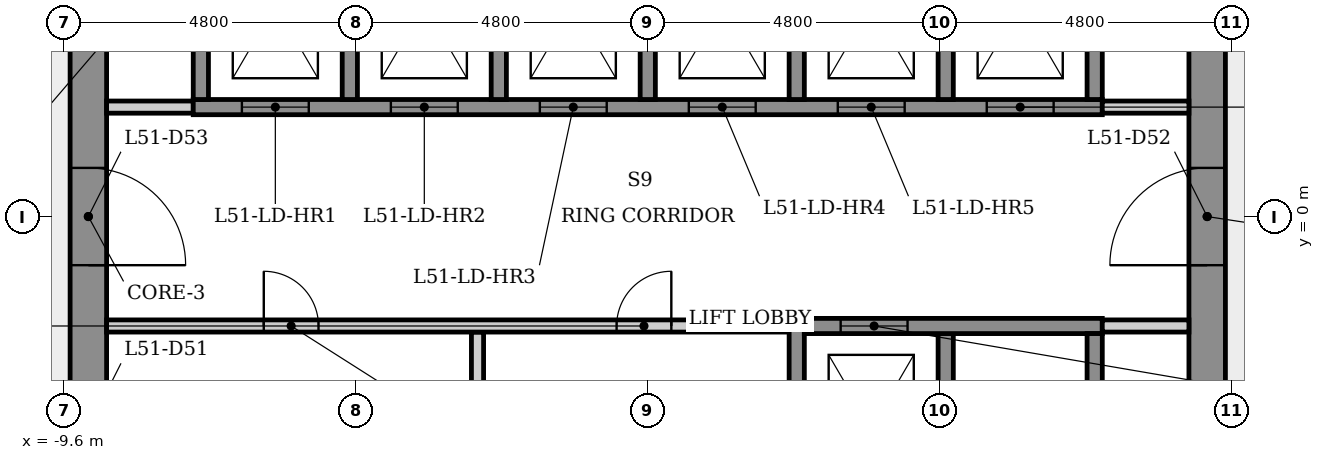
"""IFC4 building model, lengths in metres.
Left out: names, types, materials, properties, quantities, classifications, styles, units other than length and angle.
Written with IfcOpenShell. Run it as: python <this file> out.ifc"""

import sys

from ifc_helpers import new_model, si_unit, direction, frame, frame_2d, origin, place, context, subcontext, project, spatial, rectangle, extrude, element, fill, save


model = new_model("IFC4")
c1 = context("Model", 3, precision=1e-05, world=origin(), true_north=direction((0.0, 1.0)))
c2 = subcontext(c1, "Body", "Model", "MODEL_VIEW")
j1 = project(units=[si_unit("LENGTHUNIT", "METRE"), si_unit("PLANEANGLEUNIT", "RADIAN")], contexts=[c1])
p1 = place(None, origin())
s1 = spatial("IfcSite", under=j1, at=p1, CompositionType="ELEMENT")
p2 = place(p1, origin())
s2 = spatial("IfcBuilding", under=s1, at=p2, CompositionType="ELEMENT")
p3 = place(p2, frame((0.0, 0.0, 190.7)))
s3 = spatial("IfcBuildingStorey", under=s2, at=p3, CompositionType="ELEMENT", Elevation=190.7)
p4 = place(p3, frame((9.2, -5.485, 0.0), z_axis=(0.0, 0.0, 1.0), x_axis=(0.0, 1.0, 0.0)))
e1 = element("IfcWall", 1, at=p4, inside=s3, PredefinedType="SHEAR", context=c2, shape_type="SweptSolid", body=[
    extrude(rectangle(XDim=10.97, YDim=0.6, at=frame_2d((5.485, 0.0))), origin(), (0.0, 0.0, 1.0), 4.0),
])
p5 = place(p4, frame((4.685, 0.0, 0.0)))
e2 = element("IfcOpeningElement", 2, at=p5, cuts=e1, PredefinedType="OPENING", context=c2, shape_type="SweptSolid", body=[
    extrude(rectangle(XDim=1.6, YDim=2.1, at=frame_2d((0.8, 1.05))), frame((0.0, 0.31, 0.0), z_axis=(0.0, -1.0, 0.0), x_axis=(1.0, 0.0, 0.0)), (0.0, 0.0, 1.0), 0.62),
])
p6 = place(p3, frame((-9.2, 5.485, 0.0), z_axis=(0.0, 0.0, 1.0), x_axis=(0.0, -1.0, 0.0)))
e3 = element("IfcWall", 3, at=p6, inside=s3, PredefinedType="SHEAR", context=c2, shape_type="SweptSolid", body=[
    extrude(rectangle(XDim=10.97, YDim=0.6, at=frame_2d((5.485, 0.0))), origin(), (0.0, 0.0, 1.0), 4.0),
])
p7 = place(p6, frame((8.516, 0.0, 0.0)))
e4 = element("IfcOpeningElement", 4, at=p7, cuts=e3, PredefinedType="OPENING", context=c2, shape_type="SweptSolid", body=[
    extrude(rectangle(XDim=0.9, YDim=2.1, at=frame_2d((0.45, 1.05))), frame((0.0, 0.31, 0.0), z_axis=(0.0, -1.0, 0.0), x_axis=(1.0, 0.0, 0.0)), (0.0, 0.0, 1.0), 0.62),
])
p8 = place(p6, frame((4.685, 0.0, 0.0)))
e5 = element("IfcOpeningElement", 5, at=p8, cuts=e3, PredefinedType="OPENING", context=c2, shape_type="SweptSolid", body=[
    extrude(rectangle(XDim=1.6, YDim=2.1, at=frame_2d((0.8, 1.05))), frame((0.0, 0.31, 0.0), z_axis=(0.0, -1.0, 0.0), x_axis=(1.0, 0.0, 0.0)), (0.0, 0.0, 1.0), 0.62),
])
p9 = place(p3, frame((-8.9, 1.8, 0.0), z_axis=(0.0, 0.0, 1.0), x_axis=(1.0, 0.0, 0.0)))
e6 = element("IfcWall", 6, at=p9, inside=s3, PredefinedType="PARTITIONING", context=c2, shape_type="SweptSolid", body=[
    extrude(rectangle(XDim=1.425, YDim=0.2, at=frame_2d((0.712, 0.0))), origin(), (0.0, 0.0, 1.0), 3.6),
])
p10 = place(p3, frame((-7.475, 1.8, 0.0), z_axis=(0.0, 0.0, 1.0), x_axis=(1.0, 0.0, 0.0)))
e7 = element("IfcWall", 7, at=p10, inside=s3, PredefinedType="SHEAR", context=c2, shape_type="SweptSolid", body=[
    extrude(rectangle(XDim=14.95, YDim=0.25, at=frame_2d((7.475, 0.0))), origin(), (0.0, 0.0, 1.0), 3.6),
])
p11 = place(p10, frame((0.8, 0.0, 0.0)))
e8 = element("IfcOpeningElement", 8, at=p11, cuts=e7, PredefinedType="OPENING", context=c2, shape_type="SweptSolid", body=[
    extrude(rectangle(XDim=1.1, YDim=2.1, at=frame_2d((0.55, 1.05))), frame((0.0, 0.135, 0.0), z_axis=(0.0, -1.0, 0.0), x_axis=(1.0, 0.0, 0.0)), (0.0, 0.0, 1.0), 0.27),
])
p12 = place(p10, frame((3.25, 0.0, 0.0)))
e9 = element("IfcOpeningElement", 9, at=p12, cuts=e7, PredefinedType="OPENING", context=c2, shape_type="SweptSolid", body=[
    extrude(rectangle(XDim=1.1, YDim=2.1, at=frame_2d((0.55, 1.05))), frame((0.0, 0.135, 0.0), z_axis=(0.0, -1.0, 0.0), x_axis=(1.0, 0.0, 0.0)), (0.0, 0.0, 1.0), 0.27),
])
p13 = place(p10, frame((5.7, 0.0, 0.0)))
e10 = element("IfcOpeningElement", 10, at=p13, cuts=e7, PredefinedType="OPENING", context=c2, shape_type="SweptSolid", body=[
    extrude(rectangle(XDim=1.1, YDim=2.1, at=frame_2d((0.55, 1.05))), frame((0.0, 0.135, 0.0), z_axis=(0.0, -1.0, 0.0), x_axis=(1.0, 0.0, 0.0)), (0.0, 0.0, 1.0), 0.27),
])
p14 = place(p10, frame((8.15, 0.0, 0.0)))
e11 = element("IfcOpeningElement", 11, at=p14, cuts=e7, PredefinedType="OPENING", context=c2, shape_type="SweptSolid", body=[
    extrude(rectangle(XDim=1.1, YDim=2.1, at=frame_2d((0.55, 1.05))), frame((0.0, 0.135, 0.0), z_axis=(0.0, -1.0, 0.0), x_axis=(1.0, 0.0, 0.0)), (0.0, 0.0, 1.0), 0.27),
])
p15 = place(p10, frame((10.6, 0.0, 0.0)))
e12 = element("IfcOpeningElement", 12, at=p15, cuts=e7, PredefinedType="OPENING", context=c2, shape_type="SweptSolid", body=[
    extrude(rectangle(XDim=1.1, YDim=2.1, at=frame_2d((0.55, 1.05))), frame((0.0, 0.135, 0.0), z_axis=(0.0, -1.0, 0.0), x_axis=(1.0, 0.0, 0.0)), (0.0, 0.0, 1.0), 0.27),
])
p16 = place(p10, frame((13.05, 0.0, 0.0)))
e13 = element("IfcOpeningElement", 13, at=p16, cuts=e7, PredefinedType="OPENING", context=c2, shape_type="SweptSolid", body=[
    extrude(rectangle(XDim=1.1, YDim=2.1, at=frame_2d((0.55, 1.05))), frame((0.0, 0.135, 0.0), z_axis=(0.0, -1.0, 0.0), x_axis=(1.0, 0.0, 0.0)), (0.0, 0.0, 1.0), 0.27),
])
p17 = place(p3, frame((-7.35, 1.925, 0.0), z_axis=(0.0, 0.0, 1.0), x_axis=(0.0, 1.0, 0.0)))
e14 = element("IfcWall", 14, at=p17, inside=s3, PredefinedType="SHEAR", context=c2, shape_type="SweptSolid", body=[
    extrude(rectangle(XDim=4.036, YDim=0.25, at=frame_2d((2.018, 0.0))), origin(), (0.0, 0.0, 1.0), 3.6),
])
p18 = place(p3, frame((-4.9, 5.025, 0.0), z_axis=(0.0, 0.0, 1.0), x_axis=(0.0, -1.0, 0.0)))
e15 = element("IfcWall", 15, at=p18, inside=s3, PredefinedType="SHEAR", context=c2, shape_type="SweptSolid", body=[
    extrude(rectangle(XDim=3.1, YDim=0.25, at=frame_2d((1.55, 0.0))), origin(), (0.0, 0.0, 1.0), 4.0),
])
p19 = place(p3, frame((-2.8, -1.9, 0.0), z_axis=(0.0, 0.0, 1.0), x_axis=(0.0, -1.0, 0.0)))
e16 = element("IfcWall", 16, at=p19, inside=s3, PredefinedType="PARTITIONING", context=c2, shape_type="SweptSolid", body=[
    extrude(rectangle(XDim=3.15, YDim=0.2, at=frame_2d((1.575, 0.0))), origin(), (0.0, 0.0, 1.0), 3.6),
])
p20 = place(p3, frame((-8.9, -1.8, 0.0), z_axis=(0.0, 0.0, 1.0), x_axis=(1.0, 0.0, 0.0)))
e17 = element("IfcWall", 17, at=p20, inside=s3, PredefinedType="PARTITIONING", context=c2, shape_type="SweptSolid", body=[
    extrude(rectangle(XDim=11.225, YDim=0.2, at=frame_2d((5.613, 0.0))), origin(), (0.0, 0.0, 1.0), 3.6),
])
p21 = place(p20, frame((2.585, 0.0, 0.0)))
e18 = element("IfcOpeningElement", 18, at=p21, cuts=e17, PredefinedType="OPENING", context=c2, shape_type="SweptSolid", body=[
    extrude(rectangle(XDim=0.9, YDim=2.1, at=frame_2d((0.45, 1.05))), frame((0.0, 0.11, 0.0), z_axis=(0.0, -1.0, 0.0), x_axis=(1.0, 0.0, 0.0)), (0.0, 0.0, 1.0), 0.22),
])
p22 = place(p20, frame((8.387, 0.0, 0.0)))
e19 = element("IfcOpeningElement", 19, at=p22, cuts=e17, PredefinedType="OPENING", context=c2, shape_type="SweptSolid", body=[
    extrude(rectangle(XDim=0.9, YDim=2.1, at=frame_2d((0.45, 1.05))), frame((0.0, 0.11, 0.0), z_axis=(0.0, -1.0, 0.0), x_axis=(1.0, 0.0, 0.0)), (0.0, 0.0, 1.0), 0.22),
])
for number, where, z_axis, x_axis in (
    (20, (-2.45, 5.025, 0.0), (0.0, 0.0, 1.0), (0.0, -1.0, 0.0)),
    (21, (0.0, 5.025, 0.0), (0.0, 0.0, 1.0), (0.0, -1.0, 0.0)),
):
    element("IfcWall", number, at=place(p3, frame(where, z_axis=z_axis, x_axis=x_axis)), inside=s3, PredefinedType="SHEAR", context=c2, shape_type="SweptSolid", body=[
        extrude(rectangle(XDim=3.1, YDim=0.25, at=frame_2d((1.55, 0.0))), origin(), (0.0, 0.0, 1.0), 4.0),
    ])
p23 = place(p3, frame((2.45, -5.275, 0.0), z_axis=(0.0, 0.0, 1.0), x_axis=(0.0, 1.0, 0.0)))
e22 = element("IfcWall", 22, at=p23, inside=s3, PredefinedType="SHEAR", context=c2, shape_type="SweptSolid", body=[
    extrude(rectangle(XDim=3.6, YDim=0.25, at=frame_2d((1.8, 0.0))), origin(), (0.0, 0.0, 1.0), 3.6),
])
for number, where, z_axis, x_axis in (
    (23, (2.45, 5.025, 0.0), (0.0, 0.0, 1.0), (0.0, -1.0, 0.0)),
    (24, (4.9, -1.925, 0.0), (0.0, 0.0, 1.0), (0.0, -1.0, 0.0)),
    (25, (4.9, 5.025, 0.0), (0.0, 0.0, 1.0), (0.0, -1.0, 0.0)),
):
    element("IfcWall", number, at=place(p3, frame(where, z_axis=z_axis, x_axis=x_axis)), inside=s3, PredefinedType="SHEAR", context=c2, shape_type="SweptSolid", body=[
        extrude(rectangle(XDim=3.1, YDim=0.25, at=frame_2d((1.55, 0.0))), origin(), (0.0, 0.0, 1.0), 4.0),
    ])
p24 = place(p3, frame((2.575, -1.8, 0.0), z_axis=(0.0, 0.0, 1.0), x_axis=(1.0, 0.0, 0.0)))
e26 = element("IfcWall", 26, at=p24, inside=s3, PredefinedType="SHEAR", context=c2, shape_type="SweptSolid", body=[
    extrude(rectangle(XDim=4.9, YDim=0.25, at=frame_2d((2.45, 0.0))), origin(), (0.0, 0.0, 1.0), 3.6),
])
p25 = place(p24, frame((0.597, 0.0, 0.0)))
e27 = element("IfcOpeningElement", 27, at=p25, cuts=e26, PredefinedType="OPENING", context=c2, shape_type="SweptSolid", body=[
    extrude(rectangle(XDim=1.1, YDim=2.1, at=frame_2d((0.55, 1.05))), frame((0.0, 0.135, 0.0), z_axis=(0.0, -1.0, 0.0), x_axis=(1.0, 0.0, 0.0)), (0.0, 0.0, 1.0), 0.27),
])
p26 = place(p3, frame((7.475, 1.8, 0.0), z_axis=(0.0, 0.0, 1.0), x_axis=(1.0, 0.0, 0.0)))
e28 = element("IfcWall", 28, at=p26, inside=s3, PredefinedType="PARTITIONING", context=c2, shape_type="SweptSolid", body=[
    extrude(rectangle(XDim=1.425, YDim=0.2, at=frame_2d((0.712, 0.0))), origin(), (0.0, 0.0, 1.0), 3.6),
])
for number, where, z_axis, x_axis in (
    (29, (7.35, -1.925, 0.0), (0.0, 0.0, 1.0), (0.0, -1.0, 0.0)),
    (30, (7.35, 5.025, 0.0), (0.0, 0.0, 1.0), (0.0, -1.0, 0.0)),
):
    element("IfcWall", number, at=place(p3, frame(where, z_axis=z_axis, x_axis=x_axis)), inside=s3, PredefinedType="SHEAR", context=c2, shape_type="SweptSolid", body=[
        extrude(rectangle(XDim=3.1, YDim=0.25, at=frame_2d((1.55, 0.0))), origin(), (0.0, 0.0, 1.0), 4.0),
    ])
p27 = place(p3, frame((8.9, -1.8, 0.0), z_axis=(0.0, 0.0, 1.0), x_axis=(-1.0, 0.0, 0.0)))
e31 = element("IfcWall", 31, at=p27, inside=s3, PredefinedType="PARTITIONING", context=c2, shape_type="SweptSolid", body=[
    extrude(rectangle(XDim=1.425, YDim=0.2, at=frame_2d((0.712, 0.0))), origin(), (0.0, 0.0, 1.0), 3.6),
])
p28 = place(p11, origin())
e32 = element("IfcDoor", 32, at=p28, inside=s3, OperationType="SLIDING_TO_LEFT", PredefinedType="DOOR", context=c2, shape_type="SweptSolid", body=[
    extrude(rectangle(XDim=1.1, YDim=2.1, at=frame_2d((0.55, 1.05))), frame((0.0, 0.025, 0.0), z_axis=(0.0, -1.0, 0.0), x_axis=(1.0, 0.0, 0.0)), (0.0, 0.0, 1.0), 0.05),
])
fill(e8, e32)
p29 = place(p12, origin())
e33 = element("IfcDoor", 33, at=p29, inside=s3, OperationType="SLIDING_TO_LEFT", PredefinedType="DOOR", context=c2, shape_type="SweptSolid", body=[
    extrude(rectangle(XDim=1.1, YDim=2.1, at=frame_2d((0.55, 1.05))), frame((0.0, 0.025, 0.0), z_axis=(0.0, -1.0, 0.0), x_axis=(1.0, 0.0, 0.0)), (0.0, 0.0, 1.0), 0.05),
])
fill(e9, e33)
p30 = place(p13, origin())
e34 = element("IfcDoor", 34, at=p30, inside=s3, OperationType="SLIDING_TO_LEFT", PredefinedType="DOOR", context=c2, shape_type="SweptSolid", body=[
    extrude(rectangle(XDim=1.1, YDim=2.1, at=frame_2d((0.55, 1.05))), frame((0.0, 0.025, 0.0), z_axis=(0.0, -1.0, 0.0), x_axis=(1.0, 0.0, 0.0)), (0.0, 0.0, 1.0), 0.05),
])
fill(e10, e34)
p31 = place(p14, origin())
e35 = element("IfcDoor", 35, at=p31, inside=s3, OperationType="SLIDING_TO_LEFT", PredefinedType="DOOR", context=c2, shape_type="SweptSolid", body=[
    extrude(rectangle(XDim=1.1, YDim=2.1, at=frame_2d((0.55, 1.05))), frame((0.0, 0.025, 0.0), z_axis=(0.0, -1.0, 0.0), x_axis=(1.0, 0.0, 0.0)), (0.0, 0.0, 1.0), 0.05),
])
fill(e11, e35)
p32 = place(p15, origin())
e36 = element("IfcDoor", 36, at=p32, inside=s3, OperationType="SLIDING_TO_LEFT", PredefinedType="DOOR", context=c2, shape_type="SweptSolid", body=[
    extrude(rectangle(XDim=1.1, YDim=2.1, at=frame_2d((0.55, 1.05))), frame((0.0, 0.025, 0.0), z_axis=(0.0, -1.0, 0.0), x_axis=(1.0, 0.0, 0.0)), (0.0, 0.0, 1.0), 0.05),
])
fill(e12, e36)
p33 = place(p16, origin())
e37 = element("IfcDoor", 37, at=p33, inside=s3, OperationType="SLIDING_TO_LEFT", PredefinedType="DOOR", context=c2, shape_type="SweptSolid", body=[
    extrude(rectangle(XDim=1.1, YDim=2.1, at=frame_2d((0.55, 1.05))), frame((0.0, 0.025, 0.0), z_axis=(0.0, -1.0, 0.0), x_axis=(1.0, 0.0, 0.0)), (0.0, 0.0, 1.0), 0.05),
])
fill(e13, e37)
p34 = place(p25, origin())
e38 = element("IfcDoor", 38, at=p34, inside=s3, OperationType="SLIDING_TO_LEFT", PredefinedType="DOOR", context=c2, shape_type="SweptSolid", body=[
    extrude(rectangle(XDim=1.1, YDim=2.1, at=frame_2d((0.55, 1.05))), frame((0.0, 0.025, 0.0), z_axis=(0.0, -1.0, 0.0), x_axis=(1.0, 0.0, 0.0)), (0.0, 0.0, 1.0), 0.05),
])
fill(e27, e38)
p35 = place(p21, origin())
e39 = element("IfcDoor", 39, at=p35, inside=s3, OperationType="SINGLE_SWING_LEFT", PredefinedType="DOOR", context=c2, shape_type="SweptSolid", body=[
    extrude(rectangle(XDim=0.9, YDim=2.1, at=frame_2d((0.45, 1.05))), frame((0.0, 0.025, 0.0), z_axis=(0.0, -1.0, 0.0), x_axis=(1.0, 0.0, 0.0)), (0.0, 0.0, 1.0), 0.05),
])
fill(e18, e39)
p36 = place(p22, origin())
e40 = element("IfcDoor", 40, at=p36, inside=s3, OperationType="SINGLE_SWING_RIGHT", PredefinedType="DOOR", context=c2, shape_type="SweptSolid", body=[
    extrude(rectangle(XDim=0.9, YDim=2.1, at=frame_2d((0.45, 1.05))), frame((0.0, 0.025, 0.0), z_axis=(0.0, -1.0, 0.0), x_axis=(1.0, 0.0, 0.0)), (0.0, 0.0, 1.0), 0.05),
])
fill(e19, e40)
p37 = place(p5, origin())
e41 = element("IfcDoor", 41, at=p37, inside=s3, OperationType="SINGLE_SWING_LEFT", PredefinedType="DOOR", context=c2, shape_type="SweptSolid", body=[
    extrude(rectangle(XDim=1.6, YDim=2.1, at=frame_2d((0.8, 1.05))), frame((0.0, 0.025, 0.0), z_axis=(0.0, -1.0, 0.0), x_axis=(1.0, 0.0, 0.0)), (0.0, 0.0, 1.0), 0.05),
])
fill(e2, e41)
p38 = place(p8, origin())
e42 = element("IfcDoor", 42, at=p38, inside=s3, OperationType="SINGLE_SWING_RIGHT", PredefinedType="DOOR", context=c2, shape_type="SweptSolid", body=[
    extrude(rectangle(XDim=1.6, YDim=2.1, at=frame_2d((0.8, 1.05))), frame((0.0, 0.025, 0.0), z_axis=(0.0, -1.0, 0.0), x_axis=(1.0, 0.0, 0.0)), (0.0, 0.0, 1.0), 0.05),
])
fill(e5, e42)
save(model, sys.argv[1])
